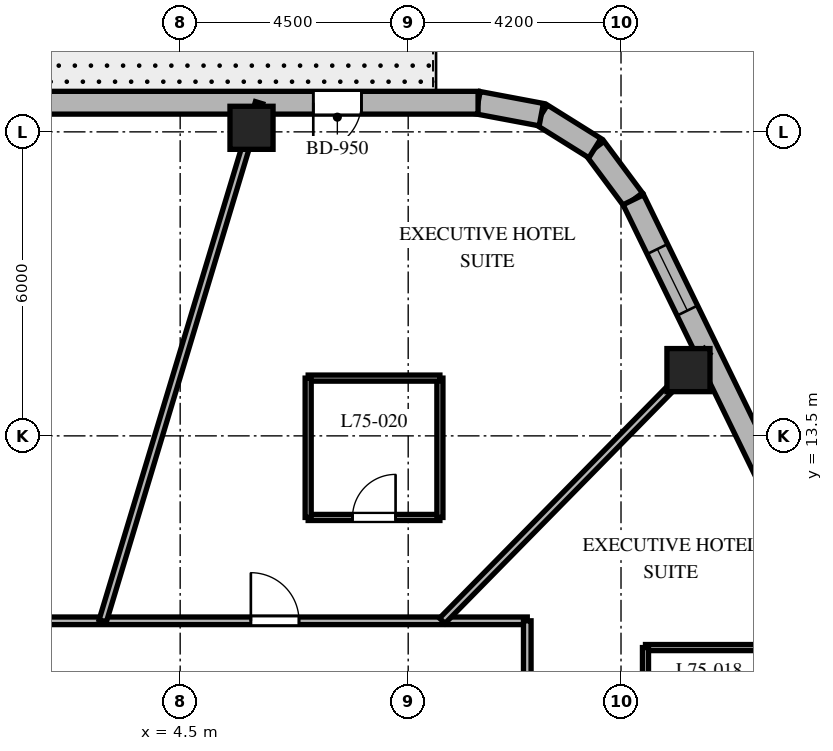
"""IFC4 building model, lengths in metres.
Left out: names, types, materials, properties, quantities, classifications, styles, units other than length and angle.
Written with IfcOpenShell. Run it as: python <this file> out.ifc"""

import sys

from ifc_helpers import new_model, si_unit, direction, frame, frame_2d, origin, origin_2d, place, context, subcontext, project, spatial, rectangle, extrude, element, fill, save


model = new_model("IFC4")
c1 = context("Model", 3, precision=1e-05, world=origin(), true_north=direction((0.0, 1.0)))
c2 = subcontext(c1, "Body", "Model", "MODEL_VIEW")
j1 = project(units=[si_unit("LENGTHUNIT", "METRE"), si_unit("PLANEANGLEUNIT", "RADIAN")], contexts=[c1])
p1 = place(None, origin())
s1 = spatial("IfcSite", under=j1, at=p1, CompositionType="ELEMENT")
p2 = place(p1, origin())
s2 = spatial("IfcBuilding", under=s1, at=p2, CompositionType="ELEMENT")
p3 = place(p2, frame((0.0, 0.0, 301.5)))
s3 = spatial("IfcBuildingStorey", under=s2, at=p3, CompositionType="ELEMENT", Elevation=301.5)
for number, where, z_axis, x_axis in (
    (1, (14.531, 14.798, 0.0), (0.0, 0.0, 1.0), (1.0, 0.0, 0.0)),
    (2, (5.908, 19.58, 0.0), (0.0, 0.0, 1.0), (1.0, 0.0, 0.0)),
):
    element("IfcColumn", number, at=place(p3, frame(where, z_axis=z_axis, x_axis=x_axis)), inside=s3, PredefinedType="COLUMN", context=c2, shape_type="SweptSolid", body=[
        extrude(rectangle(XDim=0.85, YDim=0.85, at=origin_2d()), origin(), (0.0, 0.0, 1.0), 3.9),
    ])
p4 = place(p3, frame((13.443, 18.16, 0.0), z_axis=(0.0, 0.0, 1.0), x_axis=(-0.597042425808, 0.802209661987, 0.0)))
e3 = element("IfcWall", 3, at=p4, inside=s3, PredefinedType="SOLIDWALL", context=c2, shape_type="SweptSolid", body=[
    extrude(rectangle(XDim=1.27, YDim=0.45, at=frame_2d((0.635, 0.0))), origin(), (0.0, 0.0, 1.0), 3.58),
])
p5 = place(p3, frame((12.685, 19.178, 0.0), z_axis=(0.0, 0.0, 1.0), x_axis=(-0.848031272749, 0.529946186362, 0.0)))
e4 = element("IfcWall", 4, at=p5, inside=s3, PredefinedType="SOLIDWALL", context=c2, shape_type="SweptSolid", body=[
    extrude(rectangle(XDim=1.248, YDim=0.45, at=frame_2d((0.624, 0.0))), origin(), (0.0, 0.0, 1.0), 3.58),
])
p6 = place(p3, frame((11.626, 19.84, 0.0), z_axis=(0.0, 0.0, 1.0), x_axis=(-0.982701956681, 0.185194126083, 0.0)))
e5 = element("IfcWall", 5, at=p6, inside=s3, PredefinedType="SOLIDWALL", context=c2, shape_type="SweptSolid", body=[
    extrude(rectangle(XDim=1.27, YDim=0.45, at=frame_2d((0.635, 0.0))), origin(), (0.0, 0.0, 1.0), 3.58),
])
p7 = place(p3, frame((21.138, 2.371, 0.0), z_axis=(0.0, 0.0, 1.0), x_axis=(-0.438128124058, 0.89891253574, 0.0)))
e6 = element("IfcWall", 6, at=p7, inside=s3, PredefinedType="SOLIDWALL", context=c2, shape_type="SweptSolid", body=[
    extrude(rectangle(XDim=17.565, YDim=0.45, at=frame_2d((8.782, 0.0))), origin(), (0.0, 0.0, 1.0), 3.58),
])
p8 = place(p7, frame((1.133, 0.0, 0.8)))
e7 = element("IfcOpeningElement", 7, at=p8, cuts=e6, PredefinedType="OPENING", context=c2, shape_type="SweptSolid", body=[
    extrude(rectangle(XDim=1.35, YDim=1.75, at=frame_2d((0.675, 0.875))), frame((0.0, 0.235, 0.0), z_axis=(0.0, -1.0, 0.0), x_axis=(1.0, 0.0, 0.0)), (0.0, 0.0, 1.0), 0.47),
])
p9 = place(p7, frame((8.158, 0.0, 0.8)))
e8 = element("IfcOpeningElement", 8, at=p9, cuts=e6, PredefinedType="OPENING", context=c2, shape_type="SweptSolid", body=[
    extrude(rectangle(XDim=1.35, YDim=1.75, at=frame_2d((0.675, 0.875))), frame((0.0, 0.235, 0.0), z_axis=(0.0, -1.0, 0.0), x_axis=(1.0, 0.0, 0.0)), (0.0, 0.0, 1.0), 0.47),
])
p10 = place(p7, frame((15.132, 0.0, 0.8)))
e9 = element("IfcOpeningElement", 9, at=p10, cuts=e6, PredefinedType="OPENING", context=c2, shape_type="SweptSolid", body=[
    extrude(rectangle(XDim=1.35, YDim=1.75, at=frame_2d((0.675, 0.875))), frame((0.0, 0.235, 0.0), z_axis=(0.0, -1.0, 0.0), x_axis=(1.0, 0.0, 0.0)), (0.0, 0.0, 1.0), 0.47),
])
p11 = place(p3, frame((10.379, 20.075, 0.0), z_axis=(0.0, 0.0, 1.0), x_axis=(-1.0, 0.0, 0.0)))
e10 = element("IfcWall", 10, at=p11, inside=s3, PredefinedType="SOLIDWALL", context=c2, shape_type="SweptSolid", body=[
    extrude(rectangle(XDim=22.417, YDim=0.45, at=frame_2d((11.208, 0.0))), origin(), (0.0, 0.0, 1.0), 3.58),
])
p12 = place(p11, frame((2.302, 0.0, 0.0)))
e11 = element("IfcOpeningElement", 11, at=p12, cuts=e10, PredefinedType="OPENING", context=c2, shape_type="SweptSolid", body=[
    extrude(rectangle(XDim=0.95, YDim=2.15, at=frame_2d((0.475, 1.075))), frame((0.0, 0.235, 0.0), z_axis=(0.0, -1.0, 0.0), x_axis=(1.0, 0.0, 0.0)), (0.0, 0.0, 1.0), 0.47),
])
p13 = place(p11, frame((10.534, 0.0, 0.8)))
e12 = element("IfcOpeningElement", 12, at=p13, cuts=e10, PredefinedType="OPENING", context=c2, shape_type="SweptSolid", body=[
    extrude(rectangle(XDim=1.35, YDim=1.75, at=frame_2d((0.675, 0.875))), frame((0.0, 0.235, 0.0), z_axis=(0.0, -1.0, 0.0), x_axis=(1.0, 0.0, 0.0)), (0.0, 0.0, 1.0), 0.47),
])
p14 = place(p11, frame((19.587, 0.0, 0.8)))
e13 = element("IfcOpeningElement", 13, at=p14, cuts=e10, PredefinedType="OPENING", context=c2, shape_type="SweptSolid", body=[
    extrude(rectangle(XDim=1.35, YDim=1.75, at=frame_2d((0.675, 0.875))), frame((0.0, 0.235, 0.0), z_axis=(0.0, -1.0, 0.0), x_axis=(1.0, 0.0, 0.0)), (0.0, 0.0, 1.0), 0.47),
])
p15 = place(p3, frame((0.92, 9.85, 0.0), z_axis=(0.0, 0.0, 1.0), x_axis=(1.0, 0.0, 0.0)))
e14 = element("IfcWall", 14, at=p15, inside=s3, PredefinedType="PARTITIONING", context=c2, shape_type="SweptSolid", body=[
    extrude(rectangle(XDim=10.43, YDim=0.15, at=frame_2d((5.215, 0.0))), origin(), (0.0, 0.0, 1.0), 2.17),
])
p16 = place(p15, frame((4.975, 0.0, 0.0)))
e15 = element("IfcOpeningElement", 15, at=p16, cuts=e14, PredefinedType="OPENING", context=c2, shape_type="SweptSolid", body=[
    extrude(rectangle(XDim=0.95, YDim=2.03, at=frame_2d((0.475, 1.015))), frame((0.0, 0.085, 0.0), z_axis=(0.0, -1.0, 0.0), x_axis=(1.0, 0.0, 0.0)), (0.0, 0.0, 1.0), 0.17),
])
p17 = place(p3, frame((11.35, 9.85, 0.0), z_axis=(0.0, 0.0, 1.0), x_axis=(0.0, -1.0, 0.0)))
e16 = element("IfcWall", 16, at=p17, inside=s3, PredefinedType="PARTITIONING", context=c2, shape_type="SweptSolid", body=[
    extrude(rectangle(XDim=12.4, YDim=0.15, at=frame_2d((6.2, 0.0))), origin(), (0.0, 0.0, 1.0), 2.17),
])
p18 = place(p17, frame((7.697, 0.0, 0.0)))
e17 = element("IfcOpeningElement", 17, at=p18, cuts=e16, PredefinedType="OPENING", context=c2, shape_type="SweptSolid", body=[
    extrude(rectangle(XDim=0.95, YDim=2.03, at=frame_2d((0.475, 1.015))), frame((0.0, 0.085, 0.0), z_axis=(0.0, -1.0, 0.0), x_axis=(1.0, 0.0, 0.0)), (0.0, 0.0, 1.0), 0.17),
])
p19 = place(p17, frame((2.998, 0.0, 0.0)))
e18 = element("IfcOpeningElement", 18, at=p19, cuts=e16, PredefinedType="OPENING", context=c2, shape_type="SweptSolid", body=[
    extrude(rectangle(XDim=0.95, YDim=2.03, at=frame_2d((0.475, 1.015))), frame((0.0, 0.085, 0.0), z_axis=(0.0, -1.0, 0.0), x_axis=(1.0, 0.0, 0.0)), (0.0, 0.0, 1.0), 0.17),
])
p20 = place(p17, frame((10.333, 0.0, 0.0)))
e19 = element("IfcOpeningElement", 19, at=p20, cuts=e16, PredefinedType="OPENING", context=c2, shape_type="SweptSolid", body=[
    extrude(rectangle(XDim=0.9, YDim=2.03, at=frame_2d((0.45, 1.015))), frame((0.0, 0.085, 0.0), z_axis=(0.0, -1.0, 0.0), x_axis=(1.0, 0.0, 0.0)), (0.0, 0.0, 1.0), 0.17),
])
p21 = place(p3, frame((9.672, 9.85, 0.0), z_axis=(0.0, 0.0, 1.0), x_axis=(0.700629771301, 0.713524998558, 0.0)))
e20 = element("IfcWall", 20, at=p21, inside=s3, PredefinedType="PARTITIONING", context=c2, shape_type="SweptSolid", body=[
    extrude(rectangle(XDim=7.459, YDim=0.15, at=frame_2d((3.73, 0.0))), origin(), (0.0, 0.0, 1.0), 2.17),
])
p22 = place(p3, frame((2.972, 9.85, 0.0), z_axis=(0.0, 0.0, 1.0), x_axis=(0.288872169679, 0.957367677324, 0.0)))
e21 = element("IfcWall", 21, at=p22, inside=s3, PredefinedType="PARTITIONING", context=c2, shape_type="SweptSolid", body=[
    extrude(rectangle(XDim=10.68, YDim=0.15, at=frame_2d((5.34, 0.0))), origin(), (0.0, 0.0, 1.0), 2.17),
])
p23 = place(p3, frame((16.203, 9.322, 0.0), z_axis=(0.0, 0.0, 1.0), x_axis=(-1.0, 0.0, 0.0)))
e22 = element("IfcWall", 22, at=p23, inside=s3, PredefinedType="PARTITIONING", context=c2, shape_type="SweptSolid", body=[
    extrude(rectangle(XDim=2.52, YDim=0.12, at=frame_2d((1.26, 0.0))), origin(), (0.0, 0.0, 1.0), 3.106),
])
p24 = place(p3, frame((13.683, 9.322, 0.0), z_axis=(0.0, 0.0, 1.0), x_axis=(0.0, -1.0, 0.0)))
e23 = element("IfcWall", 23, at=p24, inside=s3, PredefinedType="PARTITIONING", context=c2, shape_type="SweptSolid", body=[
    extrude(rectangle(XDim=2.68, YDim=0.12, at=frame_2d((1.34, 0.0))), origin(), (0.0, 0.0, 1.0), 3.58),
])
p25 = place(p3, frame((7.026, 11.89, 0.0), z_axis=(0.0, 0.0, 1.0), x_axis=(1.0, 0.0, 0.0)))
e24 = element("IfcWall", 24, at=p25, inside=s3, PredefinedType="PARTITIONING", context=c2, shape_type="SweptSolid", body=[
    extrude(rectangle(XDim=2.6, YDim=0.12, at=frame_2d((1.3, 0.0))), origin(), (0.0, 0.0, 1.0), 3.021),
])
p26 = place(p25, frame((0.875, 0.0, 0.0)))
e25 = element("IfcOpeningElement", 25, at=p26, cuts=e24, PredefinedType="OPENING", context=c2, shape_type="SweptSolid", body=[
    extrude(rectangle(XDim=0.85, YDim=2.03, at=frame_2d((0.425, 1.015))), frame((0.0, 0.07, 0.0), z_axis=(0.0, -1.0, 0.0), x_axis=(1.0, 0.0, 0.0)), (0.0, 0.0, 1.0), 0.14),
])
p27 = place(p3, frame((9.626, 11.89, 0.0), z_axis=(0.0, 0.0, 1.0), x_axis=(0.0, 1.0, 0.0)))
e26 = element("IfcWall", 26, at=p27, inside=s3, PredefinedType="PARTITIONING", context=c2, shape_type="SweptSolid", body=[
    extrude(rectangle(XDim=2.75, YDim=0.12, at=frame_2d((1.375, 0.0))), origin(), (0.0, 0.0, 1.0), 3.152),
])
p28 = place(p3, frame((9.626, 14.64, 0.0), z_axis=(0.0, 0.0, 1.0), x_axis=(-1.0, 0.0, 0.0)))
e27 = element("IfcWall", 27, at=p28, inside=s3, PredefinedType="PARTITIONING", context=c2, shape_type="SweptSolid", body=[
    extrude(rectangle(XDim=2.6, YDim=0.12, at=frame_2d((1.3, 0.0))), origin(), (0.0, 0.0, 1.0), 3.152),
])
p29 = place(p3, frame((7.026, 14.64, 0.0), z_axis=(0.0, 0.0, 1.0), x_axis=(0.0, -1.0, 0.0)))
e28 = element("IfcWall", 28, at=p29, inside=s3, PredefinedType="PARTITIONING", context=c2, shape_type="SweptSolid", body=[
    extrude(rectangle(XDim=2.75, YDim=0.12, at=frame_2d((1.375, 0.0))), origin(), (0.0, 0.0, 1.0), 3.021),
])
p30 = place(p10, origin())
e29 = element("IfcWindow", 29, at=p30, inside=s3, PartitioningType="SINGLE_PANEL", PredefinedType="WINDOW", context=c2, shape_type="SweptSolid", body=[
    extrude(rectangle(XDim=1.35, YDim=1.75, at=frame_2d((0.675, 0.875))), frame((0.0, 0.03, 0.0), z_axis=(0.0, -1.0, 0.0), x_axis=(1.0, 0.0, 0.0)), (0.0, 0.0, 1.0), 0.06),
])
fill(e9, e29)
p31 = place(p12, origin())
e30 = element("IfcDoor", 30, at=p31, inside=s3, OperationType="SINGLE_SWING_RIGHT", PredefinedType="DOOR", context=c2, shape_type="SweptSolid", body=[
    extrude(rectangle(XDim=0.95, YDim=2.15, at=frame_2d((0.475, 1.075))), frame((0.0, 0.025, 0.0), z_axis=(0.0, -1.0, 0.0), x_axis=(1.0, 0.0, 0.0)), (0.0, 0.0, 1.0), 0.05),
])
fill(e11, e30)
p32 = place(p16, origin())
e31 = element("IfcDoor", 31, at=p32, inside=s3, OperationType="SINGLE_SWING_LEFT", PredefinedType="DOOR", context=c2, shape_type="SweptSolid", body=[
    extrude(rectangle(XDim=0.95, YDim=2.03, at=frame_2d((0.475, 1.015))), frame((0.0, 0.025, 0.0), z_axis=(0.0, -1.0, 0.0), x_axis=(1.0, 0.0, 0.0)), (0.0, 0.0, 1.0), 0.05),
])
fill(e15, e31)
p33 = place(p26, origin())
e32 = element("IfcDoor", 32, at=p33, inside=s3, OperationType="SINGLE_SWING_RIGHT", PredefinedType="DOOR", context=c2, shape_type="SweptSolid", body=[
    extrude(rectangle(XDim=0.85, YDim=2.03, at=frame_2d((0.425, 1.015))), frame((0.0, 0.025, 0.0), z_axis=(0.0, -1.0, 0.0), x_axis=(1.0, 0.0, 0.0)), (0.0, 0.0, 1.0), 0.05),
])
fill(e25, e32)
save(model, sys.argv[1])
